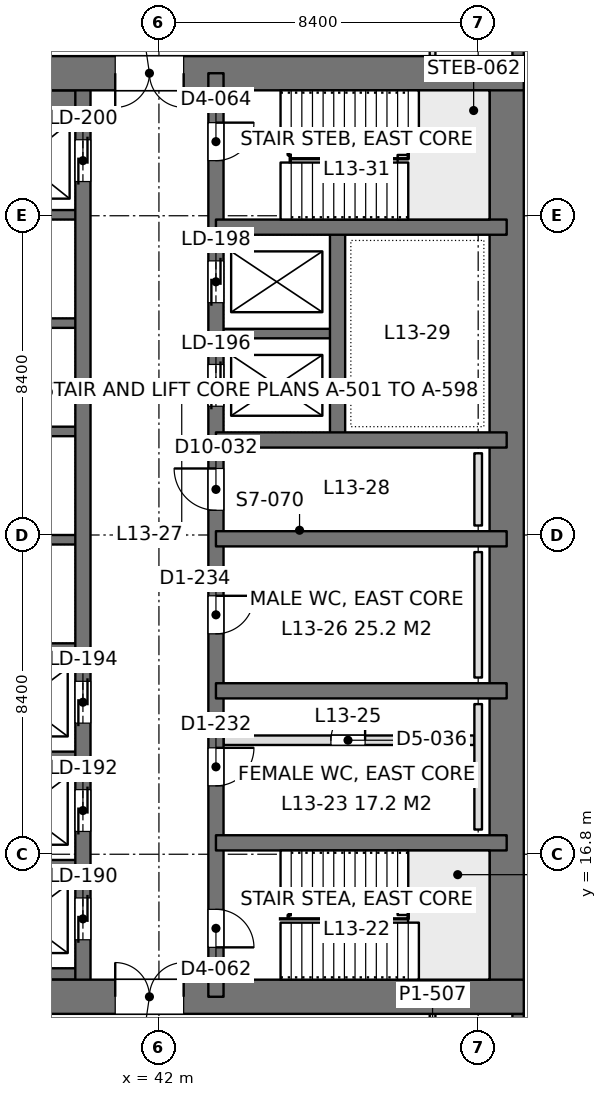
"""IFC4 building model, lengths in metres.
Left out: names, types, materials, properties, quantities, classifications, styles, units other than length and angle.
Written with IfcOpenShell. Run it as: python <this file> out.ifc"""

import sys

from ifc_helpers import new_model, si_unit, direction, frame, frame_2d, origin, place, context, subcontext, project, spatial, rectangle, extrude, element, fill, save


model = new_model("IFC4")
c1 = context("Model", 3, precision=1e-05, world=origin(), true_north=direction((0.0, 1.0)))
c2 = subcontext(c1, "Body", "Model", "MODEL_VIEW")
j1 = project(units=[si_unit("LENGTHUNIT", "METRE"), si_unit("PLANEANGLEUNIT", "RADIAN")], contexts=[c1])
p1 = place(None, origin())
s1 = spatial("IfcSite", under=j1, at=p1, CompositionType="ELEMENT")
p2 = place(p1, origin())
s2 = spatial("IfcBuilding", under=s1, at=p2, CompositionType="ELEMENT")
p3 = place(p2, frame((0.0, 0.0, 59.4)))
s3 = spatial("IfcBuildingStorey", under=s2, at=p3, CompositionType="ELEMENT", Elevation=59.4)
p4 = place(p3, frame((33.6, 13.05, 0.0), z_axis=(0.0, 0.0, 1.0), x_axis=(1.0, 0.0, 0.0)))
e1 = element("IfcWall", 1, at=p4, inside=s3, PredefinedType="SHEAR", context=c2, shape_type="SweptSolid", body=[
    extrude(rectangle(XDim=18.0, YDim=0.9, at=frame_2d((9.0, 0.0))), origin(), (0.0, 0.0, 1.0), 4.5),
])
p5 = place(p4, frame((7.25, 0.0, 0.0)))
e2 = element("IfcOpeningElement", 2, at=p5, cuts=e1, PredefinedType="OPENING", context=c2, shape_type="SweptSolid", body=[
    extrude(rectangle(XDim=1.8, YDim=2.4, at=frame_2d((0.9, 1.2))), frame((0.0, 0.46, 0.0), z_axis=(0.0, -1.0, 0.0), x_axis=(1.0, 0.0, 0.0)), (0.0, 0.0, 1.0), 0.92),
])
p6 = place(p3, frame((33.6, 37.35, 0.0), z_axis=(0.0, 0.0, 1.0), x_axis=(1.0, 0.0, 0.0)))
e3 = element("IfcWall", 3, at=p6, inside=s3, PredefinedType="SHEAR", context=c2, shape_type="SweptSolid", body=[
    extrude(rectangle(XDim=18.0, YDim=0.9, at=frame_2d((9.0, 0.0))), origin(), (0.0, 0.0, 1.0), 4.5),
])
p7 = place(p6, frame((7.25, 0.0, 0.0)))
e4 = element("IfcOpeningElement", 4, at=p7, cuts=e3, PredefinedType="OPENING", context=c2, shape_type="SweptSolid", body=[
    extrude(rectangle(XDim=1.8, YDim=2.4, at=frame_2d((0.9, 1.2))), frame((0.0, 0.46, 0.0), z_axis=(0.0, -1.0, 0.0), x_axis=(1.0, 0.0, 0.0)), (0.0, 0.0, 1.0), 0.92),
])
p8 = place(p3, frame((51.15, 13.05, 0.0), z_axis=(0.0, 0.0, 1.0), x_axis=(0.0, 1.0, 0.0)))
e5 = element("IfcWall", 5, at=p8, inside=s3, PredefinedType="SHEAR", context=c2, shape_type="SweptSolid", body=[
    extrude(rectangle(XDim=24.3, YDim=0.9, at=frame_2d((12.15, 0.0))), origin(), (0.0, 0.0, 1.0), 4.5),
])
p9 = place(p3, frame((43.5, 13.05, 0.0), z_axis=(0.0, 0.0, 1.0), x_axis=(0.0, 1.0, 0.0)))
e6 = element("IfcWall", 6, at=p9, inside=s3, PredefinedType="SHEAR", context=c2, shape_type="SweptSolid", body=[
    extrude(rectangle(XDim=24.3, YDim=0.4, at=frame_2d((12.15, 0.0))), origin(), (0.0, 0.0, 1.0), 4.5),
])
p10 = place(p9, frame((1.3, 0.0, 0.0)))
e7 = element("IfcOpeningElement", 7, at=p10, cuts=e6, PredefinedType="OPENING", context=c2, shape_type="SweptSolid", body=[
    extrude(rectangle(XDim=1.0, YDim=2.2, at=frame_2d((0.5, 1.1))), frame((0.0, 0.21, 0.0), z_axis=(0.0, -1.0, 0.0), x_axis=(1.0, 0.0, 0.0)), (0.0, 0.0, 1.0), 0.42),
])
p11 = place(p9, frame((22.0, 0.0, 0.0)))
e8 = element("IfcOpeningElement", 8, at=p11, cuts=e6, PredefinedType="OPENING", context=c2, shape_type="SweptSolid", body=[
    extrude(rectangle(XDim=1.0, YDim=2.2, at=frame_2d((0.5, 1.1))), frame((0.0, 0.21, 0.0), z_axis=(0.0, -1.0, 0.0), x_axis=(1.0, 0.0, 0.0)), (0.0, 0.0, 1.0), 0.42),
])
p12 = place(p9, frame((5.55, 0.0, 0.0)))
e9 = element("IfcOpeningElement", 9, at=p12, cuts=e6, PredefinedType="OPENING", context=c2, shape_type="SweptSolid", body=[
    extrude(rectangle(XDim=1.0, YDim=2.2, at=frame_2d((0.5, 1.1))), frame((0.0, 0.21, 0.0), z_axis=(0.0, -1.0, 0.0), x_axis=(1.0, 0.0, 0.0)), (0.0, 0.0, 1.0), 0.42),
])
p13 = place(p9, frame((9.55, 0.0, 0.0)))
e10 = element("IfcOpeningElement", 10, at=p13, cuts=e6, PredefinedType="OPENING", context=c2, shape_type="SweptSolid", body=[
    extrude(rectangle(XDim=1.0, YDim=2.2, at=frame_2d((0.5, 1.1))), frame((0.0, 0.21, 0.0), z_axis=(0.0, -1.0, 0.0), x_axis=(1.0, 0.0, 0.0)), (0.0, 0.0, 1.0), 0.42),
])
p14 = place(p9, frame((12.8, 0.0, 0.0)))
e11 = element("IfcOpeningElement", 11, at=p14, cuts=e6, PredefinedType="OPENING", context=c2, shape_type="SweptSolid", body=[
    extrude(rectangle(XDim=1.1, YDim=2.2, at=frame_2d((0.55, 1.1))), frame((0.0, 0.21, 0.0), z_axis=(0.0, -1.0, 0.0), x_axis=(1.0, 0.0, 0.0)), (0.0, 0.0, 1.0), 0.42),
])
p15 = place(p9, frame((15.538, 0.0, 0.0)))
e12 = element("IfcOpeningElement", 12, at=p15, cuts=e6, PredefinedType="OPENING", context=c2, shape_type="SweptSolid", body=[
    extrude(rectangle(XDim=1.1, YDim=2.2, at=frame_2d((0.55, 1.1))), frame((0.0, 0.21, 0.0), z_axis=(0.0, -1.0, 0.0), x_axis=(1.0, 0.0, 0.0)), (0.0, 0.0, 1.0), 0.42),
])
p16 = place(p9, frame((18.262, 0.0, 0.0)))
e13 = element("IfcOpeningElement", 13, at=p16, cuts=e6, PredefinedType="OPENING", context=c2, shape_type="SweptSolid", body=[
    extrude(rectangle(XDim=1.1, YDim=2.2, at=frame_2d((0.55, 1.1))), frame((0.0, 0.21, 0.0), z_axis=(0.0, -1.0, 0.0), x_axis=(1.0, 0.0, 0.0)), (0.0, 0.0, 1.0), 0.42),
])
p17 = place(p3, frame((40.0, 13.05, 0.0), z_axis=(0.0, 0.0, 1.0), x_axis=(0.0, 1.0, 0.0)))
e14 = element("IfcWall", 14, at=p17, inside=s3, PredefinedType="SHEAR", context=c2, shape_type="SweptSolid", body=[
    extrude(rectangle(XDim=24.3, YDim=0.4, at=frame_2d((12.15, 0.0))), origin(), (0.0, 0.0, 1.0), 4.5),
])
p18 = place(p17, frame((1.5, 0.0, 0.0)))
e15 = element("IfcOpeningElement", 15, at=p18, cuts=e14, PredefinedType="OPENING", context=c2, shape_type="SweptSolid", body=[
    extrude(rectangle(XDim=1.1, YDim=2.2, at=frame_2d((0.55, 1.1))), frame((0.0, 0.21, 0.0), z_axis=(0.0, -1.0, 0.0), x_axis=(1.0, 0.0, 0.0)), (0.0, 0.0, 1.0), 0.42),
])
p19 = place(p17, frame((4.35, 0.0, 0.0)))
e16 = element("IfcOpeningElement", 16, at=p19, cuts=e14, PredefinedType="OPENING", context=c2, shape_type="SweptSolid", body=[
    extrude(rectangle(XDim=1.1, YDim=2.2, at=frame_2d((0.55, 1.1))), frame((0.0, 0.21, 0.0), z_axis=(0.0, -1.0, 0.0), x_axis=(1.0, 0.0, 0.0)), (0.0, 0.0, 1.0), 0.42),
])
p20 = place(p17, frame((7.2, 0.0, 0.0)))
e17 = element("IfcOpeningElement", 17, at=p20, cuts=e14, PredefinedType="OPENING", context=c2, shape_type="SweptSolid", body=[
    extrude(rectangle(XDim=1.1, YDim=2.2, at=frame_2d((0.55, 1.1))), frame((0.0, 0.21, 0.0), z_axis=(0.0, -1.0, 0.0), x_axis=(1.0, 0.0, 0.0)), (0.0, 0.0, 1.0), 0.42),
])
p21 = place(p17, frame((21.45, 0.0, 0.0)))
e18 = element("IfcOpeningElement", 18, at=p21, cuts=e14, PredefinedType="OPENING", context=c2, shape_type="SweptSolid", body=[
    extrude(rectangle(XDim=1.1, YDim=2.2, at=frame_2d((0.55, 1.1))), frame((0.0, 0.21, 0.0), z_axis=(0.0, -1.0, 0.0), x_axis=(1.0, 0.0, 0.0)), (0.0, 0.0, 1.0), 0.42),
])
for number, where, z_axis, x_axis in (
    (19, (51.15, 17.1, 0.0), (0.0, 0.0, 1.0), (-1.0, 0.0, 0.0)),
    (20, (51.15, 21.1, 0.0), (0.0, 0.0, 1.0), (-1.0, 0.0, 0.0)),
    (21, (51.15, 25.1, 0.0), (0.0, 0.0, 1.0), (-1.0, 0.0, 0.0)),
    (22, (51.15, 27.7, 0.0), (0.0, 0.0, 1.0), (-1.0, 0.0, 0.0)),
    (23, (51.15, 33.3, 0.0), (0.0, 0.0, 1.0), (-1.0, 0.0, 0.0)),
):
    element("IfcWall", number, at=place(p3, frame(where, z_axis=z_axis, x_axis=x_axis)), inside=s3, PredefinedType="SHEAR", context=c2, shape_type="SweptSolid", body=[
        extrude(rectangle(XDim=7.65, YDim=0.4, at=frame_2d((3.825, 0.0))), origin(), (0.0, 0.0, 1.0), 4.5),
    ])
p22 = place(p3, frame((46.7, 27.7, 0.0), z_axis=(0.0, 0.0, 1.0), x_axis=(0.0, 1.0, 0.0)))
e24 = element("IfcWall", 24, at=p22, inside=s3, PredefinedType="SHEAR", context=c2, shape_type="SweptSolid", body=[
    extrude(rectangle(XDim=5.6, YDim=0.4, at=frame_2d((2.8, 0.0))), origin(), (0.0, 0.0, 1.0), 4.5),
])
p23 = place(p3, frame((46.7, 30.5, 0.0), z_axis=(0.0, 0.0, 1.0), x_axis=(-1.0, 0.0, 0.0)))
e25 = element("IfcWall", 25, at=p23, inside=s3, PredefinedType="SHEAR", context=c2, shape_type="SweptSolid", body=[
    extrude(rectangle(XDim=3.2, YDim=0.25, at=frame_2d((1.6, 0.0))), origin(), (0.0, 0.0, 1.0), 4.5),
])
p24 = place(p3, frame((40.0, 13.65, 0.0), z_axis=(0.0, 0.0, 1.0), x_axis=(-1.0, 0.0, 0.0)))
e26 = element("IfcWall", 26, at=p24, inside=s3, PredefinedType="SHEAR", context=c2, shape_type="SweptSolid", body=[
    extrude(rectangle(XDim=3.2, YDim=0.3, at=frame_2d((1.6, 0.0))), origin(), (0.0, 0.0, 1.0), 4.5),
])
for number, where, z_axis, x_axis in (
    (27, (40.0, 16.525, 0.0), (0.0, 0.0, 1.0), (-1.0, 0.0, 0.0)),
    (28, (40.0, 19.375, 0.0), (0.0, 0.0, 1.0), (-1.0, 0.0, 0.0)),
    (29, (40.0, 22.225, 0.0), (0.0, 0.0, 1.0), (-1.0, 0.0, 0.0)),
    (30, (40.0, 25.075, 0.0), (0.0, 0.0, 1.0), (-1.0, 0.0, 0.0)),
    (31, (40.0, 27.925, 0.0), (0.0, 0.0, 1.0), (-1.0, 0.0, 0.0)),
    (32, (40.0, 30.775, 0.0), (0.0, 0.0, 1.0), (-1.0, 0.0, 0.0)),
    (33, (40.0, 33.625, 0.0), (0.0, 0.0, 1.0), (-1.0, 0.0, 0.0)),
):
    element("IfcWall", number, at=place(p3, frame(where, z_axis=z_axis, x_axis=x_axis)), inside=s3, PredefinedType="SHEAR", context=c2, shape_type="SweptSolid", body=[
        extrude(rectangle(XDim=3.2, YDim=0.25, at=frame_2d((1.6, 0.0))), origin(), (0.0, 0.0, 1.0), 4.5),
    ])
p25 = place(p3, frame((40.0, 36.625, 0.0), z_axis=(0.0, 0.0, 1.0), x_axis=(-1.0, 0.0, 0.0)))
e34 = element("IfcWall", 34, at=p25, inside=s3, PredefinedType="SHEAR", context=c2, shape_type="SweptSolid", body=[
    extrude(rectangle(XDim=3.2, YDim=0.55, at=frame_2d((1.6, 0.0))), origin(), (0.0, 0.0, 1.0), 4.5),
])
p26 = place(p3, frame((51.45, 42.0, 0.0), z_axis=(0.0, 0.0, 1.0), x_axis=(0.0, -1.0, 0.0)))
e35 = element("IfcWall", 35, at=p26, inside=s3, PredefinedType="SOLIDWALL", context=c2, shape_type="SweptSolid", body=[
    extrude(rectangle(XDim=4.2, YDim=0.3, at=frame_2d((2.1, 0.0))), origin(), (0.0, 0.0, 1.0), 4.34),
])
p27 = place(p26, frame((0.9, 0.0, 0.9)))
e36 = element("IfcOpeningElement", 36, at=p27, cuts=e35, PredefinedType="OPENING", context=c2, shape_type="SweptSolid", body=[
    extrude(rectangle(XDim=2.4, YDim=1.9, at=frame_2d((1.2, 0.95))), frame((0.0, 0.16, 0.0), z_axis=(0.0, -1.0, 0.0), x_axis=(1.0, 0.0, 0.0)), (0.0, 0.0, 1.0), 0.32),
])
p28 = place(p3, frame((51.45, 12.6, 0.0), z_axis=(0.0, 0.0, 1.0), x_axis=(0.0, -1.0, 0.0)))
e37 = element("IfcWall", 37, at=p28, inside=s3, PredefinedType="SOLIDWALL", context=c2, shape_type="SweptSolid", body=[
    extrude(rectangle(XDim=4.2, YDim=0.3, at=frame_2d((2.1, 0.0))), origin(), (0.0, 0.0, 1.0), 4.34),
])
p29 = place(p28, frame((0.9, 0.0, 0.9)))
e38 = element("IfcOpeningElement", 38, at=p29, cuts=e37, PredefinedType="OPENING", context=c2, shape_type="SweptSolid", body=[
    extrude(rectangle(XDim=2.4, YDim=1.9, at=frame_2d((1.2, 0.95))), frame((0.0, 0.16, 0.0), z_axis=(0.0, -1.0, 0.0), x_axis=(1.0, 0.0, 0.0)), (0.0, 0.0, 1.0), 0.32),
])
p30 = place(p3, frame((49.2, 10.4, 0.0), z_axis=(0.0, 0.0, 1.0), x_axis=(0.0, 1.0, 0.0)))
e39 = element("IfcWall", 39, at=p30, inside=s3, PredefinedType="PARTITIONING", context=c2, shape_type="SweptSolid", body=[
    extrude(rectangle(XDim=2.202, YDim=0.15, at=frame_2d((1.101, 0.0))), origin(), (0.0, 0.0, 1.0), 4.34),
])
p31 = place(p3, frame((49.2, 37.8, 0.0), z_axis=(0.0, 0.0, 1.0), x_axis=(0.0, 1.0, 0.0)))
e40 = element("IfcWall", 40, at=p31, inside=s3, PredefinedType="PARTITIONING", context=c2, shape_type="SweptSolid", body=[
    extrude(rectangle(XDim=2.2, YDim=0.15, at=frame_2d((1.1, 0.0))), origin(), (0.0, 0.0, 1.0), 4.34),
])
p32 = place(p3, frame((43.7, 19.8, 0.0), z_axis=(0.0, 0.0, 1.0), x_axis=(1.0, 0.0, 0.0)))
e41 = element("IfcWall", 41, at=p32, inside=s3, PredefinedType="PARTITIONING", context=c2, shape_type="SweptSolid", body=[
    extrude(rectangle(XDim=6.6, YDim=0.25, at=frame_2d((3.3, 0.0))), origin(), (0.0, 0.0, 1.0), 4.3),
])
p33 = place(p32, frame((2.825, 0.0, 0.0)))
e42 = element("IfcOpeningElement", 42, at=p33, cuts=e41, PredefinedType="OPENING", context=c2, shape_type="SweptSolid", body=[
    extrude(rectangle(XDim=0.9, YDim=2.2, at=frame_2d((0.45, 1.1))), frame((0.0, 0.135, 0.0), z_axis=(0.0, -1.0, 0.0), x_axis=(1.0, 0.0, 0.0)), (0.0, 0.0, 1.0), 0.27),
])
for number, where, z_axis, x_axis in (
    (43, (50.4, 17.45, 0.0), (0.0, 0.0, 1.0), (0.0, 1.0, 0.0)),
    (44, (50.4, 21.45, 0.0), (0.0, 0.0, 1.0), (0.0, 1.0, 0.0)),
):
    element("IfcWall", number, at=place(p3, frame(where, z_axis=z_axis, x_axis=x_axis)), inside=s3, PredefinedType="PLUMBINGWALL", context=c2, shape_type="SweptSolid", body=[
        extrude(rectangle(XDim=3.3, YDim=0.2, at=frame_2d((1.65, 0.0))), origin(), (0.0, 0.0, 1.0), 1.2),
    ])
p34 = place(p3, frame((50.4, 25.45, 0.0), z_axis=(0.0, 0.0, 1.0), x_axis=(0.0, 1.0, 0.0)))
e45 = element("IfcWall", 45, at=p34, inside=s3, PredefinedType="PLUMBINGWALL", context=c2, shape_type="SweptSolid", body=[
    extrude(rectangle(XDim=1.9, YDim=0.2, at=frame_2d((0.95, 0.0))), origin(), (0.0, 0.0, 1.0), 1.2),
])
p35 = place(p5, origin())
e46 = element("IfcDoor", 46, at=p35, inside=s3, OperationType="DOUBLE_DOOR_SINGLE_SWING", PredefinedType="DOOR", context=c2, shape_type="SweptSolid", body=[
    extrude(rectangle(XDim=1.8, YDim=2.4, at=frame_2d((0.9, 1.2))), frame((0.0, 0.025, 0.0), z_axis=(0.0, -1.0, 0.0), x_axis=(1.0, 0.0, 0.0)), (0.0, 0.0, 1.0), 0.05),
])
fill(e2, e46)
p36 = place(p7, frame((1.8, 0.0, 0.0), z_axis=(0.0, 0.0, 1.0), x_axis=(-1.0, 0.0, 0.0)))
e47 = element("IfcDoor", 47, at=p36, inside=s3, OperationType="DOUBLE_DOOR_SINGLE_SWING", PredefinedType="DOOR", context=c2, shape_type="SweptSolid", body=[
    extrude(rectangle(XDim=1.8, YDim=2.4, at=frame_2d((0.9, 1.2))), frame((0.0, 0.025, 0.0), z_axis=(0.0, -1.0, 0.0), x_axis=(1.0, 0.0, 0.0)), (0.0, 0.0, 1.0), 0.05),
])
fill(e4, e47)
p37 = place(p10, frame((1.0, 0.0, 0.0), z_axis=(0.0, 0.0, 1.0), x_axis=(-1.0, 0.0, 0.0)))
e48 = element("IfcDoor", 48, at=p37, inside=s3, OperationType="SINGLE_SWING_RIGHT", PredefinedType="DOOR", context=c2, shape_type="SweptSolid", body=[
    extrude(rectangle(XDim=1.0, YDim=2.2, at=frame_2d((0.5, 1.1))), frame((0.0, 0.025, 0.0), z_axis=(0.0, -1.0, 0.0), x_axis=(1.0, 0.0, 0.0)), (0.0, 0.0, 1.0), 0.05),
])
fill(e7, e48)
p38 = place(p11, frame((1.0, 0.0, 0.0), z_axis=(0.0, 0.0, 1.0), x_axis=(-1.0, 0.0, 0.0)))
e49 = element("IfcDoor", 49, at=p38, inside=s3, OperationType="SINGLE_SWING_LEFT", PredefinedType="DOOR", context=c2, shape_type="SweptSolid", body=[
    extrude(rectangle(XDim=1.0, YDim=2.2, at=frame_2d((0.5, 1.1))), frame((0.0, 0.025, 0.0), z_axis=(0.0, -1.0, 0.0), x_axis=(1.0, 0.0, 0.0)), (0.0, 0.0, 1.0), 0.05),
])
fill(e8, e49)
p39 = place(p12, frame((1.0, 0.0, 0.0), z_axis=(0.0, 0.0, 1.0), x_axis=(-1.0, 0.0, 0.0)))
e50 = element("IfcDoor", 50, at=p39, inside=s3, OperationType="SINGLE_SWING_LEFT", PredefinedType="DOOR", context=c2, shape_type="SweptSolid", body=[
    extrude(rectangle(XDim=1.0, YDim=2.2, at=frame_2d((0.5, 1.1))), frame((0.0, 0.025, 0.0), z_axis=(0.0, -1.0, 0.0), x_axis=(1.0, 0.0, 0.0)), (0.0, 0.0, 1.0), 0.05),
])
fill(e9, e50)
p40 = place(p13, frame((1.0, 0.0, 0.0), z_axis=(0.0, 0.0, 1.0), x_axis=(-1.0, 0.0, 0.0)))
e51 = element("IfcDoor", 51, at=p40, inside=s3, OperationType="SINGLE_SWING_LEFT", PredefinedType="DOOR", context=c2, shape_type="SweptSolid", body=[
    extrude(rectangle(XDim=1.0, YDim=2.2, at=frame_2d((0.5, 1.1))), frame((0.0, 0.025, 0.0), z_axis=(0.0, -1.0, 0.0), x_axis=(1.0, 0.0, 0.0)), (0.0, 0.0, 1.0), 0.05),
])
fill(e10, e51)
p41 = place(p14, origin())
e52 = element("IfcDoor", 52, at=p41, inside=s3, OperationType="SINGLE_SWING_RIGHT", PredefinedType="DOOR", context=c2, shape_type="SweptSolid", body=[
    extrude(rectangle(XDim=1.1, YDim=2.2, at=frame_2d((0.55, 1.1))), frame((0.0, 0.025, 0.0), z_axis=(0.0, -1.0, 0.0), x_axis=(1.0, 0.0, 0.0)), (0.0, 0.0, 1.0), 0.05),
])
fill(e11, e52)
p42 = place(p18, origin())
e53 = element("IfcDoor", 53, at=p42, inside=s3, OperationType="DOUBLE_DOOR_SLIDING", PredefinedType="DOOR", context=c2, shape_type="SweptSolid", body=[
    extrude(rectangle(XDim=1.1, YDim=2.2, at=frame_2d((0.55, 1.1))), frame((0.0, 0.025, 0.0), z_axis=(0.0, -1.0, 0.0), x_axis=(1.0, 0.0, 0.0)), (0.0, 0.0, 1.0), 0.05),
])
fill(e15, e53)
p43 = place(p19, origin())
e54 = element("IfcDoor", 54, at=p43, inside=s3, OperationType="DOUBLE_DOOR_SLIDING", PredefinedType="DOOR", context=c2, shape_type="SweptSolid", body=[
    extrude(rectangle(XDim=1.1, YDim=2.2, at=frame_2d((0.55, 1.1))), frame((0.0, 0.025, 0.0), z_axis=(0.0, -1.0, 0.0), x_axis=(1.0, 0.0, 0.0)), (0.0, 0.0, 1.0), 0.05),
])
fill(e16, e54)
p44 = place(p20, origin())
e55 = element("IfcDoor", 55, at=p44, inside=s3, OperationType="DOUBLE_DOOR_SLIDING", PredefinedType="DOOR", context=c2, shape_type="SweptSolid", body=[
    extrude(rectangle(XDim=1.1, YDim=2.2, at=frame_2d((0.55, 1.1))), frame((0.0, 0.025, 0.0), z_axis=(0.0, -1.0, 0.0), x_axis=(1.0, 0.0, 0.0)), (0.0, 0.0, 1.0), 0.05),
])
fill(e17, e55)
p45 = place(p21, origin())
e56 = element("IfcDoor", 56, at=p45, inside=s3, OperationType="DOUBLE_DOOR_SLIDING", PredefinedType="DOOR", context=c2, shape_type="SweptSolid", body=[
    extrude(rectangle(XDim=1.1, YDim=2.2, at=frame_2d((0.55, 1.1))), frame((0.0, 0.025, 0.0), z_axis=(0.0, -1.0, 0.0), x_axis=(1.0, 0.0, 0.0)), (0.0, 0.0, 1.0), 0.05),
])
fill(e18, e56)
p46 = place(p15, origin())
e57 = element("IfcDoor", 57, at=p46, inside=s3, OperationType="DOUBLE_DOOR_SLIDING", PredefinedType="DOOR", context=c2, shape_type="SweptSolid", body=[
    extrude(rectangle(XDim=1.1, YDim=2.2, at=frame_2d((0.55, 1.1))), frame((0.0, 0.025, 0.0), z_axis=(0.0, -1.0, 0.0), x_axis=(1.0, 0.0, 0.0)), (0.0, 0.0, 1.0), 0.05),
])
fill(e12, e57)
p47 = place(p16, origin())
e58 = element("IfcDoor", 58, at=p47, inside=s3, OperationType="DOUBLE_DOOR_SLIDING", PredefinedType="DOOR", context=c2, shape_type="SweptSolid", body=[
    extrude(rectangle(XDim=1.1, YDim=2.2, at=frame_2d((0.55, 1.1))), frame((0.0, 0.025, 0.0), z_axis=(0.0, -1.0, 0.0), x_axis=(1.0, 0.0, 0.0)), (0.0, 0.0, 1.0), 0.05),
])
fill(e13, e58)
p48 = place(p33, origin())
e59 = element("IfcDoor", 59, at=p48, inside=s3, OperationType="SINGLE_SWING_RIGHT", PredefinedType="DOOR", context=c2, shape_type="SweptSolid", body=[
    extrude(rectangle(XDim=0.9, YDim=2.2, at=frame_2d((0.45, 1.1))), frame((0.0, 0.025, 0.0), z_axis=(0.0, -1.0, 0.0), x_axis=(1.0, 0.0, 0.0)), (0.0, 0.0, 1.0), 0.05),
])
fill(e42, e59)
save(model, sys.argv[1])
